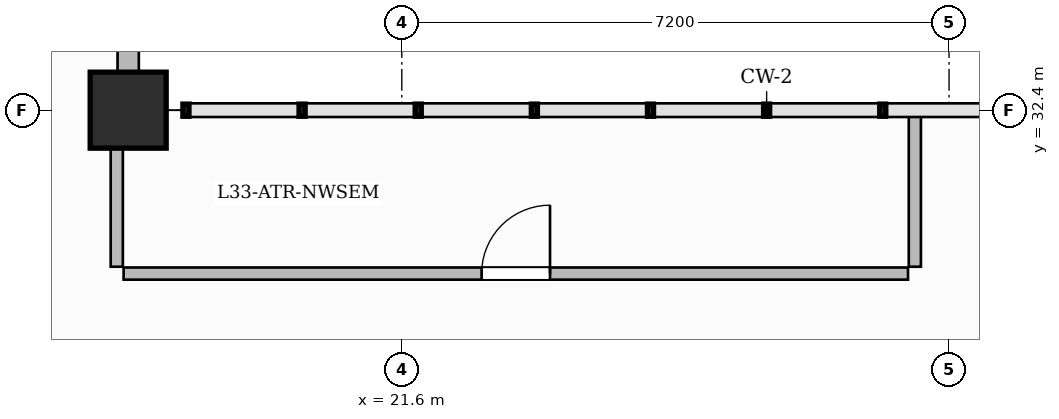
"""IFC4 building model, lengths in metres.
Left out: names, types, materials, properties, quantities, classifications, styles, units other than length and angle.
Written with IfcOpenShell. Run it as: python <this file> out.ifc"""

import sys

from ifc_helpers import new_model, si_unit, direction, frame, frame_2d, origin, origin_2d, place, context, subcontext, project, spatial, rectangle, extrude, source, transform, mapped, element, fill, save


model = new_model("IFC4")
c1 = context("Model", 3, precision=1e-05, world=origin(), true_north=direction((0.0, 1.0)))
c2 = subcontext(c1, "Body", "Model", "MODEL_VIEW")
j1 = project(units=[si_unit("LENGTHUNIT", "METRE"), si_unit("PLANEANGLEUNIT", "RADIAN")], contexts=[c1])
p1 = place(None, origin())
s1 = spatial("IfcSite", under=j1, at=p1, CompositionType="ELEMENT")
p2 = place(p1, origin())
s2 = spatial("IfcBuilding", under=s1, at=p2, CompositionType="ELEMENT")
p3 = place(p2, frame((0.0, 0.0, 134.0)))
s3 = spatial("IfcBuildingStorey", under=s2, at=p3, CompositionType="ELEMENT", Elevation=134.0)
m1 = source(origin(), c2, "Body", "SweptSolid", [
    extrude(rectangle(XDim=1.0, YDim=1.0, at=origin_2d()), origin(), (0.0, 0.0, 1.0), 3.7),
])
p4 = place(p3, frame((18.0, 32.4, 0.0), z_axis=(0.0, 0.0, 1.0), x_axis=(1.0, 0.0, 0.0)))
e1 = element("IfcColumn", 1, at=p4, inside=s3, PredefinedType="COLUMN", context=c2, shape_type="MappedRepresentation", body=[
    mapped(m1, transform((0.0, 0.0, 0.0), scale=1.0)),
])
p5 = place(p3, frame((17.85, 30.34, 0.0), z_axis=(0.0, 0.0, 1.0), x_axis=(0.0, 1.0, 0.0)))
e2 = element("IfcWall", 2, at=p5, inside=s3, PredefinedType="PARTITIONING", context=c2, shape_type="SweptSolid", body=[
    extrude(rectangle(XDim=1.87, YDim=0.16, at=frame_2d((0.935, 0.0))), origin(), (0.0, 0.0, 1.0), 3.45),
])
p6 = place(p3, frame((28.35, 30.34, 0.0), z_axis=(0.0, 0.0, 1.0), x_axis=(0.0, 1.0, 0.0)))
e3 = element("IfcWall", 3, at=p6, inside=s3, PredefinedType="PARTITIONING", context=c2, shape_type="SweptSolid", body=[
    extrude(rectangle(XDim=2.032, YDim=0.16, at=frame_2d((1.016, 0.0))), origin(), (0.0, 0.0, 1.0), 3.45),
])
p7 = place(p3, frame((17.94, 30.25, 0.0), z_axis=(0.0, 0.0, 1.0), x_axis=(1.0, 0.0, 0.0)))
e4 = element("IfcWall", 4, at=p7, inside=s3, PredefinedType="PARTITIONING", context=c2, shape_type="SweptSolid", body=[
    extrude(rectangle(XDim=10.32, YDim=0.16, at=frame_2d((5.16, 0.0))), origin(), (0.0, 0.0, 1.0), 3.45),
])
p8 = place(p7, frame((4.71, 0.0, 0.0)))
e5 = element("IfcOpeningElement", 5, at=p8, cuts=e4, PredefinedType="OPENING", context=c2, shape_type="SweptSolid", body=[
    extrude(rectangle(XDim=0.9, YDim=2.15, at=frame_2d((0.45, 1.075))), frame((0.0, 0.09, 0.0), z_axis=(0.0, -1.0, 0.0), x_axis=(1.0, 0.0, 0.0)), (0.0, 0.0, 1.0), 0.18),
])
p9 = place(p3, frame((18.0, 32.4, 0.0), z_axis=(0.0, 0.0, 1.0), x_axis=(0.0, 1.0, 0.0)))
e6 = element("IfcWall", 6, at=p9, inside=s3, PredefinedType="SOLIDWALL", context=c2, shape_type="SweptSolid", body=[
    extrude(rectangle(XDim=14.35, YDim=0.28, at=frame_2d((7.175, 0.0))), origin(), (0.0, 0.0, 1.0), 3.45),
])
p10 = place(p9, frame((1.5, 0.0, 0.0)))
e7 = element("IfcOpeningElement", 7, at=p10, cuts=e6, PredefinedType="OPENING", context=c2, shape_type="SweptSolid", body=[
    extrude(rectangle(XDim=1.2, YDim=2.2, at=frame_2d((0.6, 1.1))), frame((0.0, 0.15, 0.0), z_axis=(0.0, -1.0, 0.0), x_axis=(1.0, 0.0, 0.0)), (0.0, 0.0, 1.0), 0.3),
])
p11 = place(p9, frame((3.8, 0.0, 0.8)))
e8 = element("IfcOpeningElement", 8, at=p11, cuts=e6, PredefinedType="OPENING", context=c2, shape_type="SweptSolid", body=[
    extrude(rectangle(XDim=1.8, YDim=1.85, at=frame_2d((0.9, 0.925))), frame((0.0, 0.15, 0.0), z_axis=(0.0, -1.0, 0.0), x_axis=(1.0, 0.0, 0.0)), (0.0, 0.0, 1.0), 0.3),
])
p12 = place(p9, frame((8.525, 0.0, 0.8)))
e9 = element("IfcOpeningElement", 9, at=p12, cuts=e6, PredefinedType="OPENING", context=c2, shape_type="SweptSolid", body=[
    extrude(rectangle(XDim=1.8, YDim=1.85, at=frame_2d((0.9, 0.925))), frame((0.0, 0.15, 0.0), z_axis=(0.0, -1.0, 0.0), x_axis=(1.0, 0.0, 0.0)), (0.0, 0.0, 1.0), 0.3),
])
p13 = place(p9, frame((11.275, 0.0, 0.8)))
e10 = element("IfcOpeningElement", 10, at=p13, cuts=e6, PredefinedType="OPENING", context=c2, shape_type="SweptSolid", body=[
    extrude(rectangle(XDim=1.8, YDim=1.85, at=frame_2d((0.9, 0.925))), frame((0.0, 0.15, 0.0), z_axis=(0.0, -1.0, 0.0), x_axis=(1.0, 0.0, 0.0)), (0.0, 0.0, 1.0), 0.3),
])
m2 = source(origin(), c2, "Body", "SweptSolid", [
    extrude(rectangle(XDim=0.9, YDim=2.15, at=frame_2d((0.45, 1.075))), frame((0.0, 0.025, 0.0), z_axis=(0.0, -1.0, 0.0), x_axis=(1.0, 0.0, 0.0)), (0.0, 0.0, 1.0), 0.05),
])
p14 = place(p8, origin())
e11 = element("IfcDoor", 11, at=p14, inside=s3, OperationType="SINGLE_SWING_RIGHT", PredefinedType="DOOR", context=c2, shape_type="MappedRepresentation", body=[
    mapped(m2, transform((0.0, 0.0, 0.0), scale=1.0)),
])
fill(e5, e11)
save(model, sys.argv[1])
